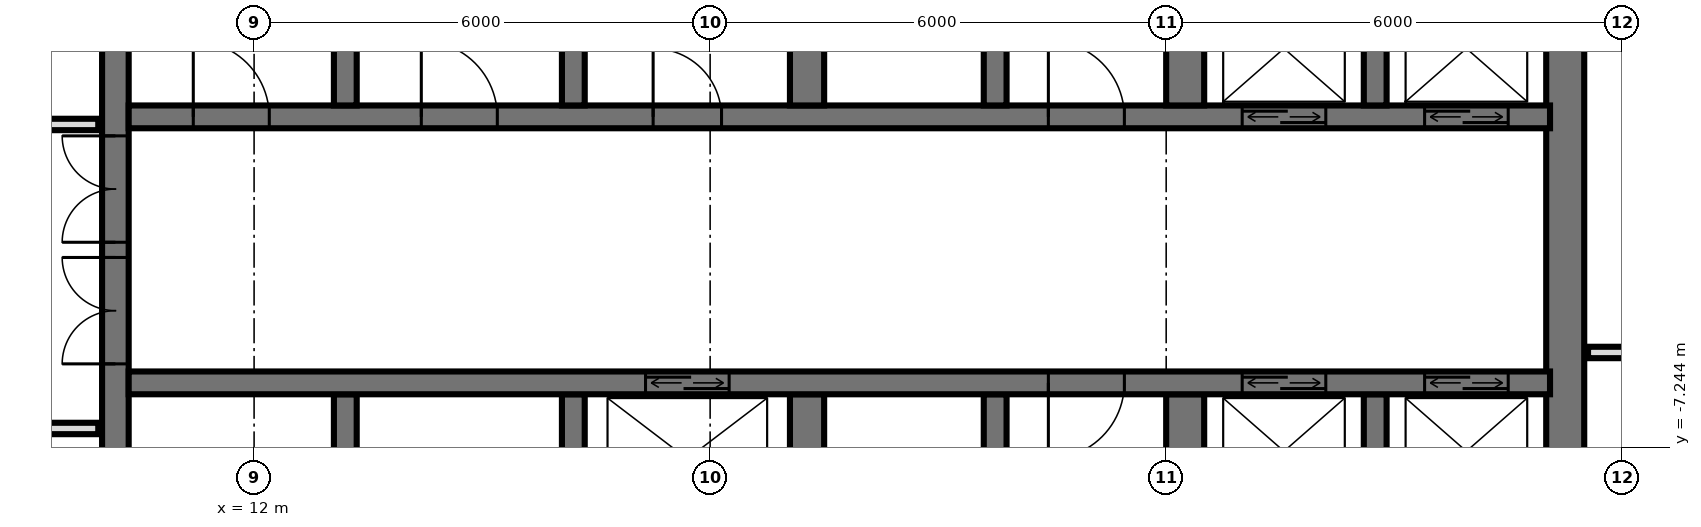
"""IFC4 building model, lengths in metres.
Left out: names, types, materials, properties, quantities, classifications, styles, units other than length and angle.
Written with IfcOpenShell. Run it as: python <this file> out.ifc"""

import sys

from ifc_helpers import new_model, si_unit, direction, frame, frame_2d, origin, place, context, subcontext, project, spatial, rectangle, extrude, element, fill, save


model = new_model("IFC4")
c1 = context("Model", 3, precision=1e-05, world=origin(), true_north=direction((0.0, 1.0)))
c2 = subcontext(c1, "Body", "Model", "MODEL_VIEW")
j1 = project(units=[si_unit("LENGTHUNIT", "METRE"), si_unit("PLANEANGLEUNIT", "RADIAN")], contexts=[c1])
p1 = place(None, origin())
s1 = spatial("IfcSite", under=j1, at=p1, CompositionType="ELEMENT")
p2 = place(p1, origin())
s2 = spatial("IfcBuilding", under=s1, at=p2, CompositionType="ELEMENT")
p3 = place(p2, frame((0.0, 0.0, 52.8)))
s3 = spatial("IfcBuildingStorey", under=s2, at=p3, CompositionType="ELEMENT", Elevation=52.8)
p4 = place(p3, frame((10.175, -14.55, 0.0), z_axis=(0.0, 0.0, 1.0), x_axis=(0.0, 1.0, 0.0)))
e1 = element("IfcWall", 1, at=p4, inside=s3, PredefinedType="SHEAR", context=c2, shape_type="SweptSolid", body=[
    extrude(rectangle(XDim=14.1, YDim=0.35, at=frame_2d((7.05, 0.0))), origin(), (0.0, 0.0, 1.0), 3.6),
])
p5 = place(p4, frame((8.4, 0.0, 0.0)))
e2 = element("IfcOpeningElement", 2, at=p5, cuts=e1, PredefinedType="OPENING", context=c2, shape_type="SweptSolid", body=[
    extrude(rectangle(XDim=1.4, YDim=2.4, at=frame_2d((0.7, 1.2))), frame((0.0, 0.185, 0.0), z_axis=(0.0, -1.0, 0.0), x_axis=(1.0, 0.0, 0.0)), (0.0, 0.0, 1.0), 0.37),
])
p6 = place(p4, frame((10.0, 0.0, 0.0)))
e3 = element("IfcOpeningElement", 3, at=p6, cuts=e1, PredefinedType="OPENING", context=c2, shape_type="SweptSolid", body=[
    extrude(rectangle(XDim=1.4, YDim=2.4, at=frame_2d((0.7, 1.2))), frame((0.0, 0.185, 0.0), z_axis=(0.0, -1.0, 0.0), x_axis=(1.0, 0.0, 0.0)), (0.0, 0.0, 1.0), 0.37),
])
p7 = place(p4, frame((4.0, 0.0, 0.0)))
e4 = element("IfcOpeningElement", 4, at=p7, cuts=e1, PredefinedType="OPENING", context=c2, shape_type="SweptSolid", body=[
    extrude(rectangle(XDim=1.2, YDim=2.1, at=frame_2d((0.6, 1.05))), frame((0.0, 0.185, 0.0), z_axis=(0.0, -1.0, 0.0), x_axis=(1.0, 0.0, 0.0)), (0.0, 0.0, 1.0), 0.37),
])
p8 = place(p3, frame((29.25, -14.55, 0.0), z_axis=(0.0, 0.0, 1.0), x_axis=(0.0, 1.0, 0.0)))
e5 = element("IfcWall", 5, at=p8, inside=s3, PredefinedType="SHEAR", context=c2, shape_type="SweptSolid", body=[
    extrude(rectangle(XDim=14.1, YDim=0.5, at=frame_2d((7.05, 0.0))), origin(), (0.0, 0.0, 1.0), 3.6),
])
p9 = place(p3, frame((10.35, -2.9, 0.0), z_axis=(0.0, 0.0, 1.0), x_axis=(1.0, 0.0, 0.0)))
e6 = element("IfcWall", 6, at=p9, inside=s3, PredefinedType="SHEAR", context=c2, shape_type="SweptSolid", body=[
    extrude(rectangle(XDim=18.7, YDim=0.3, at=frame_2d((9.35, 0.0))), origin(), (0.0, 0.0, 1.0), 3.6),
])
p10 = place(p9, frame((14.65, 0.0, 0.0)))
e7 = element("IfcOpeningElement", 7, at=p10, cuts=e6, PredefinedType="OPENING", context=c2, shape_type="SweptSolid", body=[
    extrude(rectangle(XDim=1.1, YDim=2.1, at=frame_2d((0.55, 1.05))), frame((0.0, 0.16, 0.0), z_axis=(0.0, -1.0, 0.0), x_axis=(1.0, 0.0, 0.0)), (0.0, 0.0, 1.0), 0.32),
])
p11 = place(p9, frame((17.05, 0.0, 0.0)))
e8 = element("IfcOpeningElement", 8, at=p11, cuts=e6, PredefinedType="OPENING", context=c2, shape_type="SweptSolid", body=[
    extrude(rectangle(XDim=1.1, YDim=2.1, at=frame_2d((0.55, 1.05))), frame((0.0, 0.16, 0.0), z_axis=(0.0, -1.0, 0.0), x_axis=(1.0, 0.0, 0.0)), (0.0, 0.0, 1.0), 0.32),
])
p12 = place(p9, frame((6.9, 0.0, 0.0)))
e9 = element("IfcOpeningElement", 9, at=p12, cuts=e6, PredefinedType="OPENING", context=c2, shape_type="SweptSolid", body=[
    extrude(rectangle(XDim=0.9, YDim=2.1, at=frame_2d((0.45, 1.05))), frame((0.0, 0.16, 0.0), z_axis=(0.0, -1.0, 0.0), x_axis=(1.0, 0.0, 0.0)), (0.0, 0.0, 1.0), 0.32),
])
p13 = place(p9, frame((0.85, 0.0, 0.0)))
e10 = element("IfcOpeningElement", 10, at=p13, cuts=e6, PredefinedType="OPENING", context=c2, shape_type="SweptSolid", body=[
    extrude(rectangle(XDim=1.0, YDim=2.1, at=frame_2d((0.5, 1.05))), frame((0.0, 0.16, 0.0), z_axis=(0.0, -1.0, 0.0), x_axis=(1.0, 0.0, 0.0)), (0.0, 0.0, 1.0), 0.32),
])
p14 = place(p9, frame((3.85, 0.0, 0.0)))
e11 = element("IfcOpeningElement", 11, at=p14, cuts=e6, PredefinedType="OPENING", context=c2, shape_type="SweptSolid", body=[
    extrude(rectangle(XDim=1.0, YDim=2.1, at=frame_2d((0.5, 1.05))), frame((0.0, 0.16, 0.0), z_axis=(0.0, -1.0, 0.0), x_axis=(1.0, 0.0, 0.0)), (0.0, 0.0, 1.0), 0.32),
])
p15 = place(p9, frame((12.1, 0.0, 0.0)))
e12 = element("IfcOpeningElement", 12, at=p15, cuts=e6, PredefinedType="OPENING", context=c2, shape_type="SweptSolid", body=[
    extrude(rectangle(XDim=1.0, YDim=2.1, at=frame_2d((0.5, 1.05))), frame((0.0, 0.16, 0.0), z_axis=(0.0, -1.0, 0.0), x_axis=(1.0, 0.0, 0.0)), (0.0, 0.0, 1.0), 0.32),
])
p16 = place(p3, frame((10.35, -6.4, 0.0), z_axis=(0.0, 0.0, 1.0), x_axis=(1.0, 0.0, 0.0)))
e13 = element("IfcWall", 13, at=p16, inside=s3, PredefinedType="SHEAR", context=c2, shape_type="SweptSolid", body=[
    extrude(rectangle(XDim=18.7, YDim=0.3, at=frame_2d((9.35, 0.0))), origin(), (0.0, 0.0, 1.0), 3.6),
])
p17 = place(p16, frame((14.65, 0.0, 0.0)))
e14 = element("IfcOpeningElement", 14, at=p17, cuts=e13, PredefinedType="OPENING", context=c2, shape_type="SweptSolid", body=[
    extrude(rectangle(XDim=1.1, YDim=2.1, at=frame_2d((0.55, 1.05))), frame((0.0, 0.16, 0.0), z_axis=(0.0, -1.0, 0.0), x_axis=(1.0, 0.0, 0.0)), (0.0, 0.0, 1.0), 0.32),
])
p18 = place(p16, frame((17.05, 0.0, 0.0)))
e15 = element("IfcOpeningElement", 15, at=p18, cuts=e13, PredefinedType="OPENING", context=c2, shape_type="SweptSolid", body=[
    extrude(rectangle(XDim=1.1, YDim=2.1, at=frame_2d((0.55, 1.05))), frame((0.0, 0.16, 0.0), z_axis=(0.0, -1.0, 0.0), x_axis=(1.0, 0.0, 0.0)), (0.0, 0.0, 1.0), 0.32),
])
p19 = place(p16, frame((6.8, 0.0, 0.0)))
e16 = element("IfcOpeningElement", 16, at=p19, cuts=e13, PredefinedType="OPENING", context=c2, shape_type="SweptSolid", body=[
    extrude(rectangle(XDim=1.1, YDim=2.1, at=frame_2d((0.55, 1.05))), frame((0.0, 0.16, 0.0), z_axis=(0.0, -1.0, 0.0), x_axis=(1.0, 0.0, 0.0)), (0.0, 0.0, 1.0), 0.32),
])
p20 = place(p16, frame((12.1, 0.0, 0.0)))
e17 = element("IfcOpeningElement", 17, at=p20, cuts=e13, PredefinedType="OPENING", context=c2, shape_type="SweptSolid", body=[
    extrude(rectangle(XDim=1.0, YDim=2.1, at=frame_2d((0.5, 1.05))), frame((0.0, 0.16, 0.0), z_axis=(0.0, -1.0, 0.0), x_axis=(1.0, 0.0, 0.0)), (0.0, 0.0, 1.0), 0.32),
])
for number, where, z_axis, x_axis in (
    (18, (13.2, -2.75, 0.0), (0.0, 0.0, 1.0), (0.0, 1.0, 0.0)),
    (19, (13.2, -8.85, 0.0), (0.0, 0.0, 1.0), (0.0, 1.0, 0.0)),
    (20, (16.2, -2.75, 0.0), (0.0, 0.0, 1.0), (0.0, 1.0, 0.0)),
    (21, (16.2, -8.85, 0.0), (0.0, 0.0, 1.0), (0.0, 1.0, 0.0)),
):
    element("IfcWall", number, at=place(p3, frame(where, z_axis=z_axis, x_axis=x_axis)), inside=s3, PredefinedType="SHEAR", context=c2, shape_type="SweptSolid", body=[
        extrude(rectangle(XDim=2.3, YDim=0.3, at=frame_2d((1.15, 0.0))), origin(), (0.0, 0.0, 1.0), 3.6),
    ])
for number, where, z_axis, x_axis in (
    (22, (19.275, -2.75, 0.0), (0.0, 0.0, 1.0), (0.0, 1.0, 0.0)),
    (23, (19.275, -8.85, 0.0), (0.0, 0.0, 1.0), (0.0, 1.0, 0.0)),
):
    element("IfcWall", number, at=place(p3, frame(where, z_axis=z_axis, x_axis=x_axis)), inside=s3, PredefinedType="SHEAR", context=c2, shape_type="SweptSolid", body=[
        extrude(rectangle(XDim=2.3, YDim=0.45, at=frame_2d((1.15, 0.0))), origin(), (0.0, 0.0, 1.0), 3.6),
    ])
for number, where, z_axis, x_axis in (
    (24, (21.75, -2.75, 0.0), (0.0, 0.0, 1.0), (0.0, 1.0, 0.0)),
    (25, (21.75, -8.85, 0.0), (0.0, 0.0, 1.0), (0.0, 1.0, 0.0)),
):
    element("IfcWall", number, at=place(p3, frame(where, z_axis=z_axis, x_axis=x_axis)), inside=s3, PredefinedType="SHEAR", context=c2, shape_type="SweptSolid", body=[
        extrude(rectangle(XDim=2.3, YDim=0.3, at=frame_2d((1.15, 0.0))), origin(), (0.0, 0.0, 1.0), 3.6),
    ])
for number, where, z_axis, x_axis in (
    (26, (24.25, -2.75, 0.0), (0.0, 0.0, 1.0), (0.0, 1.0, 0.0)),
    (27, (24.25, -8.85, 0.0), (0.0, 0.0, 1.0), (0.0, 1.0, 0.0)),
):
    element("IfcWall", number, at=place(p3, frame(where, z_axis=z_axis, x_axis=x_axis)), inside=s3, PredefinedType="SHEAR", context=c2, shape_type="SweptSolid", body=[
        extrude(rectangle(XDim=2.3, YDim=0.5, at=frame_2d((1.15, 0.0))), origin(), (0.0, 0.0, 1.0), 3.6),
    ])
for number, where, z_axis, x_axis in (
    (28, (26.75, -2.75, 0.0), (0.0, 0.0, 1.0), (0.0, 1.0, 0.0)),
    (29, (26.75, -8.85, 0.0), (0.0, 0.0, 1.0), (0.0, 1.0, 0.0)),
):
    element("IfcWall", number, at=place(p3, frame(where, z_axis=z_axis, x_axis=x_axis)), inside=s3, PredefinedType="SHEAR", context=c2, shape_type="SweptSolid", body=[
        extrude(rectangle(XDim=2.3, YDim=0.3, at=frame_2d((1.15, 0.0))), origin(), (0.0, 0.0, 1.0), 3.6),
    ])
p21 = place(p3, frame((-9.95, -7.0, 0.0), z_axis=(0.0, 0.0, 1.0), x_axis=(1.0, 0.0, 0.0)))
e30 = element("IfcWall", 30, at=p21, inside=s3, PredefinedType="PARTITIONING", context=c2, shape_type="SweptSolid", body=[
    extrude(rectangle(XDim=19.9, YDim=0.15, at=frame_2d((9.95, 0.0))), origin(), (0.0, 0.0, 1.0), 3.32),
])
p22 = place(p21, frame((9.45, 0.0, 0.0)))
e31 = element("IfcOpeningElement", 31, at=p22, cuts=e30, PredefinedType="OPENING", context=c2, shape_type="SweptSolid", body=[
    extrude(rectangle(XDim=1.0, YDim=2.1, at=frame_2d((0.5, 1.05))), frame((0.0, 0.085, 0.0), z_axis=(0.0, -1.0, 0.0), x_axis=(1.0, 0.0, 0.0)), (0.0, 0.0, 1.0), 0.17),
])
p23 = place(p21, frame((3.45, 0.0, 0.0)))
e32 = element("IfcOpeningElement", 32, at=p23, cuts=e30, PredefinedType="OPENING", context=c2, shape_type="SweptSolid", body=[
    extrude(rectangle(XDim=1.0, YDim=2.1, at=frame_2d((0.5, 1.05))), frame((0.0, 0.085, 0.0), z_axis=(0.0, -1.0, 0.0), x_axis=(1.0, 0.0, 0.0)), (0.0, 0.0, 1.0), 0.17),
])
p24 = place(p3, frame((29.55, -6.0, 0.0), z_axis=(0.0, 0.0, 1.0), x_axis=(1.0, 0.0, 0.0)))
e33 = element("IfcWall", 33, at=p24, inside=s3, PredefinedType="PARTITIONING", context=c2, shape_type="SweptSolid", body=[
    extrude(rectangle(XDim=3.57, YDim=0.15, at=frame_2d((1.785, 0.0))), origin(), (0.0, 0.0, 1.0), 3.32),
])
p25 = place(p24, frame((1.4, 0.0, 0.0)))
e34 = element("IfcOpeningElement", 34, at=p25, cuts=e33, PredefinedType="OPENING", context=c2, shape_type="SweptSolid", body=[
    extrude(rectangle(XDim=0.9, YDim=2.1, at=frame_2d((0.45, 1.05))), frame((0.0, 0.085, 0.0), z_axis=(0.0, -1.0, 0.0), x_axis=(1.0, 0.0, 0.0)), (0.0, 0.0, 1.0), 0.17),
])
p26 = place(p3, frame((-9.95, -3.0, 0.0), z_axis=(0.0, 0.0, 1.0), x_axis=(1.0, 0.0, 0.0)))
e35 = element("IfcWall", 35, at=p26, inside=s3, PredefinedType="PARTITIONING", context=c2, shape_type="SweptSolid", body=[
    extrude(rectangle(XDim=19.9, YDim=0.15, at=frame_2d((9.95, 0.0))), origin(), (0.0, 0.0, 1.0), 3.32),
])
p27 = place(p26, frame((4.2, 0.0, 0.0)))
e36 = element("IfcOpeningElement", 36, at=p27, cuts=e35, PredefinedType="OPENING", context=c2, shape_type="SweptSolid", body=[
    extrude(rectangle(XDim=1.0, YDim=2.1, at=frame_2d((0.5, 1.05))), frame((0.0, 0.085, 0.0), z_axis=(0.0, -1.0, 0.0), x_axis=(1.0, 0.0, 0.0)), (0.0, 0.0, 1.0), 0.17),
])
p28 = place(p26, frame((11.45, 0.0, 0.0)))
e37 = element("IfcOpeningElement", 37, at=p28, cuts=e35, PredefinedType="OPENING", context=c2, shape_type="SweptSolid", body=[
    extrude(rectangle(XDim=1.0, YDim=2.1, at=frame_2d((0.5, 1.05))), frame((0.0, 0.085, 0.0), z_axis=(0.0, -1.0, 0.0), x_axis=(1.0, 0.0, 0.0)), (0.0, 0.0, 1.0), 0.17),
])
p29 = place(p26, frame((15.45, 0.0, 0.0)))
e38 = element("IfcOpeningElement", 38, at=p29, cuts=e35, PredefinedType="OPENING", context=c2, shape_type="SweptSolid", body=[
    extrude(rectangle(XDim=1.0, YDim=2.1, at=frame_2d((0.5, 1.05))), frame((0.0, 0.085, 0.0), z_axis=(0.0, -1.0, 0.0), x_axis=(1.0, 0.0, 0.0)), (0.0, 0.0, 1.0), 0.17),
])
p30 = place(p26, frame((18.2, 0.0, 0.0)))
e39 = element("IfcOpeningElement", 39, at=p30, cuts=e35, PredefinedType="OPENING", context=c2, shape_type="SweptSolid", body=[
    extrude(rectangle(XDim=1.0, YDim=2.1, at=frame_2d((0.5, 1.05))), frame((0.0, 0.085, 0.0), z_axis=(0.0, -1.0, 0.0), x_axis=(1.0, 0.0, 0.0)), (0.0, 0.0, 1.0), 0.17),
])
p31 = place(p10, origin())
e40 = element("IfcDoor", 40, at=p31, inside=s3, OperationType="DOUBLE_DOOR_SLIDING", PredefinedType="USERDEFINED", context=c2, shape_type="SweptSolid", body=[
    extrude(rectangle(XDim=1.1, YDim=2.1, at=frame_2d((0.55, 1.05))), frame((0.0, 0.025, 0.0), z_axis=(0.0, -1.0, 0.0), x_axis=(1.0, 0.0, 0.0)), (0.0, 0.0, 1.0), 0.05),
])
fill(e7, e40)
p32 = place(p11, origin())
e41 = element("IfcDoor", 41, at=p32, inside=s3, OperationType="DOUBLE_DOOR_SLIDING", PredefinedType="USERDEFINED", context=c2, shape_type="SweptSolid", body=[
    extrude(rectangle(XDim=1.1, YDim=2.1, at=frame_2d((0.55, 1.05))), frame((0.0, 0.025, 0.0), z_axis=(0.0, -1.0, 0.0), x_axis=(1.0, 0.0, 0.0)), (0.0, 0.0, 1.0), 0.05),
])
fill(e8, e41)
p33 = place(p17, origin())
e42 = element("IfcDoor", 42, at=p33, inside=s3, OperationType="DOUBLE_DOOR_SLIDING", PredefinedType="USERDEFINED", context=c2, shape_type="SweptSolid", body=[
    extrude(rectangle(XDim=1.1, YDim=2.1, at=frame_2d((0.55, 1.05))), frame((0.0, 0.025, 0.0), z_axis=(0.0, -1.0, 0.0), x_axis=(1.0, 0.0, 0.0)), (0.0, 0.0, 1.0), 0.05),
])
fill(e14, e42)
p34 = place(p18, origin())
e43 = element("IfcDoor", 43, at=p34, inside=s3, OperationType="DOUBLE_DOOR_SLIDING", PredefinedType="USERDEFINED", context=c2, shape_type="SweptSolid", body=[
    extrude(rectangle(XDim=1.1, YDim=2.1, at=frame_2d((0.55, 1.05))), frame((0.0, 0.025, 0.0), z_axis=(0.0, -1.0, 0.0), x_axis=(1.0, 0.0, 0.0)), (0.0, 0.0, 1.0), 0.05),
])
fill(e15, e43)
p35 = place(p19, origin())
e44 = element("IfcDoor", 44, at=p35, inside=s3, OperationType="DOUBLE_DOOR_SLIDING", PredefinedType="USERDEFINED", context=c2, shape_type="SweptSolid", body=[
    extrude(rectangle(XDim=1.1, YDim=2.1, at=frame_2d((0.55, 1.05))), frame((0.0, 0.025, 0.0), z_axis=(0.0, -1.0, 0.0), x_axis=(1.0, 0.0, 0.0)), (0.0, 0.0, 1.0), 0.05),
])
fill(e16, e44)
p36 = place(p5, origin())
e45 = element("IfcDoor", 45, at=p36, inside=s3, OperationType="DOUBLE_DOOR_SINGLE_SWING", PredefinedType="DOOR", context=c2, shape_type="SweptSolid", body=[
    extrude(rectangle(XDim=1.4, YDim=2.4, at=frame_2d((0.7, 1.2))), frame((0.0, 0.025, 0.0), z_axis=(0.0, -1.0, 0.0), x_axis=(1.0, 0.0, 0.0)), (0.0, 0.0, 1.0), 0.05),
])
fill(e2, e45)
p37 = place(p6, origin())
e46 = element("IfcDoor", 46, at=p37, inside=s3, OperationType="DOUBLE_DOOR_SINGLE_SWING", PredefinedType="DOOR", context=c2, shape_type="SweptSolid", body=[
    extrude(rectangle(XDim=1.4, YDim=2.4, at=frame_2d((0.7, 1.2))), frame((0.0, 0.025, 0.0), z_axis=(0.0, -1.0, 0.0), x_axis=(1.0, 0.0, 0.0)), (0.0, 0.0, 1.0), 0.05),
])
fill(e3, e46)
p38 = place(p12, origin())
e47 = element("IfcDoor", 47, at=p38, inside=s3, OperationType="SINGLE_SWING_RIGHT", PredefinedType="DOOR", context=c2, shape_type="SweptSolid", body=[
    extrude(rectangle(XDim=0.9, YDim=2.1, at=frame_2d((0.45, 1.05))), frame((0.0, 0.025, 0.0), z_axis=(0.0, -1.0, 0.0), x_axis=(1.0, 0.0, 0.0)), (0.0, 0.0, 1.0), 0.05),
])
fill(e9, e47)
p39 = place(p13, origin())
e48 = element("IfcDoor", 48, at=p39, inside=s3, OperationType="SINGLE_SWING_RIGHT", PredefinedType="DOOR", context=c2, shape_type="SweptSolid", body=[
    extrude(rectangle(XDim=1.0, YDim=2.1, at=frame_2d((0.5, 1.05))), frame((0.0, 0.025, 0.0), z_axis=(0.0, -1.0, 0.0), x_axis=(1.0, 0.0, 0.0)), (0.0, 0.0, 1.0), 0.05),
])
fill(e10, e48)
p40 = place(p14, origin())
e49 = element("IfcDoor", 49, at=p40, inside=s3, OperationType="SINGLE_SWING_RIGHT", PredefinedType="DOOR", context=c2, shape_type="SweptSolid", body=[
    extrude(rectangle(XDim=1.0, YDim=2.1, at=frame_2d((0.5, 1.05))), frame((0.0, 0.025, 0.0), z_axis=(0.0, -1.0, 0.0), x_axis=(1.0, 0.0, 0.0)), (0.0, 0.0, 1.0), 0.05),
])
fill(e11, e49)
p41 = place(p15, origin())
e50 = element("IfcDoor", 50, at=p41, inside=s3, OperationType="SINGLE_SWING_RIGHT", PredefinedType="DOOR", context=c2, shape_type="SweptSolid", body=[
    extrude(rectangle(XDim=1.0, YDim=2.1, at=frame_2d((0.5, 1.05))), frame((0.0, 0.025, 0.0), z_axis=(0.0, -1.0, 0.0), x_axis=(1.0, 0.0, 0.0)), (0.0, 0.0, 1.0), 0.05),
])
fill(e12, e50)
p42 = place(p20, frame((0.5, 0.0, 0.0), z_axis=(0.0, 0.0, 1.0), x_axis=(-1.0, 0.0, 0.0)))
e51 = element("IfcDoor", 51, at=p42, inside=s3, OperationType="SINGLE_SWING_LEFT", PredefinedType="DOOR", context=c2, shape_type="SweptSolid", body=[
    extrude(rectangle(XDim=1.0, YDim=2.1, at=frame_2d((0.0, 1.05))), frame((0.0, -0.025, 0.0), z_axis=(0.0, 1.0, 0.0), x_axis=(-1.0, 0.0, 0.0)), (0.0, 0.0, 1.0), 0.05),
])
fill(e17, e51)
save(model, sys.argv[1])
